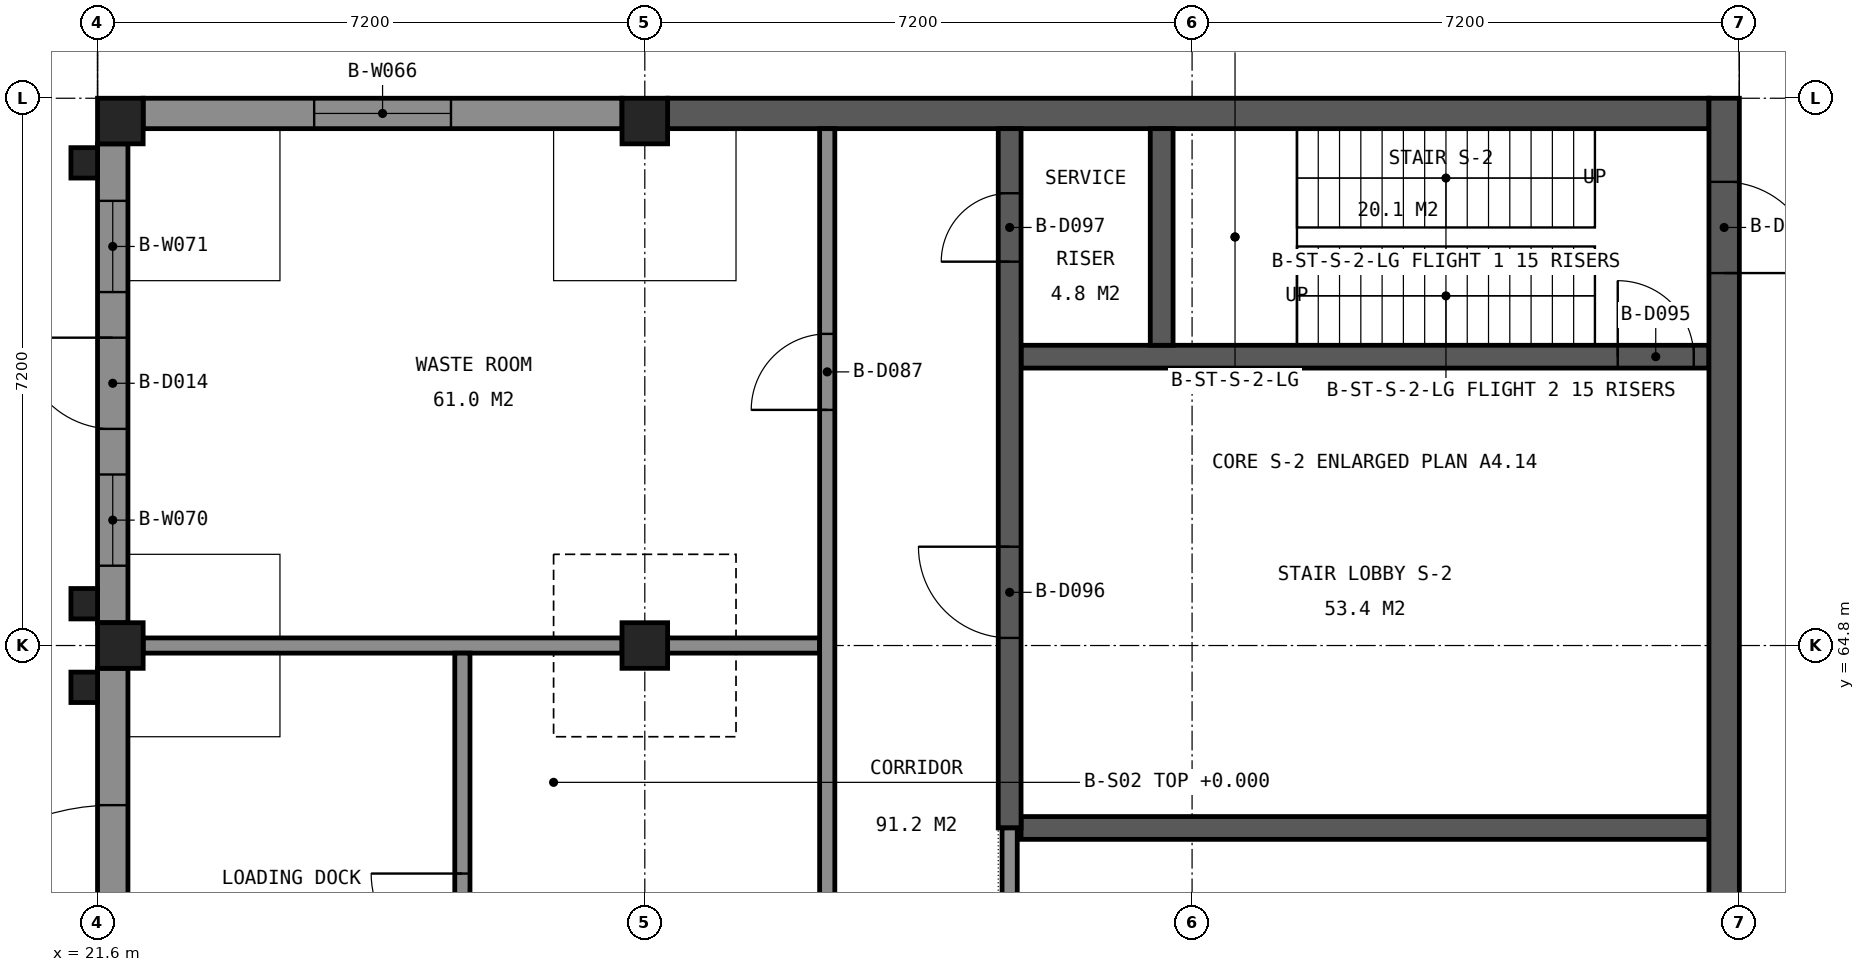
"""IFC4 building model, lengths in metres.
Left out: names, types, materials, properties, quantities, classifications, styles, units other than length and angle.
Written with IfcOpenShell. Run it as: python <this file> out.ifc"""

import sys

from ifc_helpers import new_model, si_unit, direction, frame, frame_2d, origin, origin_2d, place, context, subcontext, project, spatial, rectangle, extrude, element, fill, save


model = new_model("IFC4")
c1 = context("Model", 3, precision=1e-05, world=origin(), true_north=direction((0.0, 1.0)))
c2 = subcontext(c1, "Body", "Model", "MODEL_VIEW")
j1 = project(units=[si_unit("LENGTHUNIT", "METRE"), si_unit("PLANEANGLEUNIT", "RADIAN")], contexts=[c1])
p1 = place(None, origin())
s1 = spatial("IfcSite", under=j1, at=p1, CompositionType="ELEMENT")
p2 = place(p1, origin())
s2 = spatial("IfcBuilding", under=s1, at=p2, CompositionType="ELEMENT")
p3 = place(p2, origin())
s3 = spatial("IfcBuildingStorey", under=s2, at=p3, CompositionType="ELEMENT", Elevation=0.0)
for number, where, z_axis, x_axis in (
    (1, (21.9, 64.8, 0.0), (0.0, 0.0, 1.0), (1.0, 0.0, 0.0)),
    (2, (21.9, 71.7, 0.0), (0.0, 0.0, 1.0), (1.0, 0.0, 0.0)),
    (3, (28.8, 64.8, 0.0), (0.0, 0.0, 1.0), (1.0, 0.0, 0.0)),
    (4, (28.8, 71.7, 0.0), (0.0, 0.0, 1.0), (1.0, 0.0, 0.0)),
):
    element("IfcColumn", number, at=place(p3, frame(where, z_axis=z_axis, x_axis=x_axis)), inside=s3, PredefinedType="COLUMN", context=c2, shape_type="SweptSolid", body=[
        extrude(rectangle(XDim=0.6, YDim=0.6, at=origin_2d()), origin(), (0.0, 0.0, 1.0), 4.8),
    ])
p4 = place(p3, frame((33.75, 62.4, 0.0), z_axis=(0.0, 0.0, 1.0), x_axis=(1.0, 0.0, 0.0)))
e5 = element("IfcWall", 5, at=p4, inside=s3, PredefinedType="SHEAR", context=c2, shape_type="SweptSolid", body=[
    extrude(rectangle(XDim=9.05, YDim=0.3, at=frame_2d((4.525, 0.0))), origin(), (0.0, 0.0, 1.0), 4.55),
])
p5 = place(p3, frame((33.75, 68.6, 0.0), z_axis=(0.0, 0.0, 1.0), x_axis=(1.0, 0.0, 0.0)))
e6 = element("IfcWall", 6, at=p5, inside=s3, PredefinedType="SHEAR", context=c2, shape_type="SweptSolid", body=[
    extrude(rectangle(XDim=9.05, YDim=0.3, at=frame_2d((4.525, 0.0))), origin(), (0.0, 0.0, 1.0), 4.55),
])
p6 = place(p5, frame((7.85, 0.0, 0.0)))
e7 = element("IfcOpeningElement", 7, at=p6, cuts=e6, PredefinedType="OPENING", context=c2, shape_type="SweptSolid", body=[
    extrude(rectangle(XDim=1.0, YDim=2.1, at=frame_2d((0.5, 1.05))), frame((0.0, 0.16, 0.0), z_axis=(0.0, -1.0, 0.0), x_axis=(1.0, 0.0, 0.0)), (0.0, 0.0, 1.0), 0.32),
])
p7 = place(p3, frame((29.1, 71.8, 0.0), z_axis=(0.0, 0.0, 1.0), x_axis=(1.0, 0.0, 0.0)))
e8 = element("IfcWall", 8, at=p7, inside=s3, PredefinedType="SHEAR", context=c2, shape_type="SweptSolid", body=[
    extrude(rectangle(XDim=13.7, YDim=0.4, at=frame_2d((6.85, 0.0))), origin(), (0.0, 0.0, 1.0), 4.55),
])
p8 = place(p3, frame((33.6, 62.4, 0.0), z_axis=(0.0, 0.0, 1.0), x_axis=(0.0, 1.0, 0.0)))
e9 = element("IfcWall", 9, at=p8, inside=s3, PredefinedType="SHEAR", context=c2, shape_type="SweptSolid", body=[
    extrude(rectangle(XDim=9.2, YDim=0.3, at=frame_2d((4.6, 0.0))), origin(), (0.0, 0.0, 1.0), 4.55),
])
p9 = place(p8, frame((2.5, 0.0, 0.0)))
e10 = element("IfcOpeningElement", 10, at=p9, cuts=e9, PredefinedType="OPENING", context=c2, shape_type="SweptSolid", body=[
    extrude(rectangle(XDim=1.2, YDim=2.1, at=frame_2d((0.6, 1.05))), frame((0.0, 0.16, 0.0), z_axis=(0.0, -1.0, 0.0), x_axis=(1.0, 0.0, 0.0)), (0.0, 0.0, 1.0), 0.32),
])
p10 = place(p8, frame((7.45, 0.0, 0.0)))
e11 = element("IfcOpeningElement", 11, at=p10, cuts=e9, PredefinedType="OPENING", context=c2, shape_type="SweptSolid", body=[
    extrude(rectangle(XDim=0.9, YDim=2.1, at=frame_2d((0.45, 1.05))), frame((0.0, 0.16, 0.0), z_axis=(0.0, -1.0, 0.0), x_axis=(1.0, 0.0, 0.0)), (0.0, 0.0, 1.0), 0.32),
])
p11 = place(p3, frame((35.6, 68.75, 0.0), z_axis=(0.0, 0.0, 1.0), x_axis=(0.0, 1.0, 0.0)))
e12 = element("IfcWall", 12, at=p11, inside=s3, PredefinedType="SHEAR", context=c2, shape_type="SweptSolid", body=[
    extrude(rectangle(XDim=2.85, YDim=0.3, at=frame_2d((1.425, 0.0))), origin(), (0.0, 0.0, 1.0), 4.55),
])
p12 = place(p3, frame((43.0, 57.9, 0.0), z_axis=(0.0, 0.0, 1.0), x_axis=(0.0, 1.0, 0.0)))
e13 = element("IfcWall", 13, at=p12, inside=s3, PredefinedType="SHEAR", context=c2, shape_type="SweptSolid", body=[
    extrude(rectangle(XDim=14.1, YDim=0.4, at=frame_2d((7.05, 0.0))), origin(), (0.0, 0.0, 1.0), 4.55),
])
p13 = place(p12, frame((13.0, 0.0, 0.0), z_axis=(0.0, 0.0, 1.0), x_axis=(-1.0, 0.0, 0.0)))
e14 = element("IfcOpeningElement", 14, at=p13, cuts=e13, PredefinedType="OPENING", context=c2, shape_type="SweptSolid", body=[
    extrude(rectangle(XDim=1.2, YDim=2.1, at=frame_2d((0.6, 1.05))), frame((0.0, 0.21, 0.0), z_axis=(0.0, -1.0, 0.0), x_axis=(1.0, 0.0, 0.0)), (0.0, 0.0, 1.0), 0.42),
])
p14 = place(p3, frame((22.2, 71.8, 0.0), z_axis=(0.0, 0.0, 1.0), x_axis=(1.0, 0.0, 0.0)))
e15 = element("IfcWall", 15, at=p14, inside=s3, PredefinedType="SOLIDWALL", context=c2, shape_type="SweptSolid", body=[
    extrude(rectangle(XDim=6.3, YDim=0.4, at=frame_2d((3.15, 0.0))), origin(), (0.0, 0.0, 1.0), 3.95),
])
p15 = place(p14, frame((2.25, 0.0, 2.0)))
e16 = element("IfcOpeningElement", 16, at=p15, cuts=e15, PredefinedType="OPENING", context=c2, shape_type="SweptSolid", body=[
    extrude(rectangle(XDim=1.8, YDim=1.5, at=frame_2d((0.9, 0.75))), frame((0.0, 0.21, 0.0), z_axis=(0.0, -1.0, 0.0), x_axis=(1.0, 0.0, 0.0)), (0.0, 0.0, 1.0), 0.42),
])
p16 = place(p3, frame((21.8, 57.9, 0.0), z_axis=(0.0, 0.0, 1.0), x_axis=(0.0, 1.0, 0.0)))
e17 = element("IfcWall", 17, at=p16, inside=s3, PredefinedType="SOLIDWALL", context=c2, shape_type="SweptSolid", body=[
    extrude(rectangle(XDim=6.6, YDim=0.4, at=frame_2d((3.3, 0.0))), origin(), (0.0, 0.0, 1.0), 3.95),
])
p17 = place(p16, frame((1.8, 0.0, 0.0)))
e18 = element("IfcOpeningElement", 18, at=p17, cuts=e17, PredefinedType="OPENING", context=c2, shape_type="SweptSolid", body=[
    extrude(rectangle(XDim=3.0, YDim=3.0, at=frame_2d((1.5, 1.5))), frame((0.0, 0.21, 0.0), z_axis=(0.0, -1.0, 0.0), x_axis=(1.0, 0.0, 0.0)), (0.0, 0.0, 1.0), 0.42),
])
p18 = place(p3, frame((21.8, 65.1, 0.0), z_axis=(0.0, 0.0, 1.0), x_axis=(0.0, 1.0, 0.0)))
e19 = element("IfcWall", 19, at=p18, inside=s3, PredefinedType="SOLIDWALL", context=c2, shape_type="SweptSolid", body=[
    extrude(rectangle(XDim=6.3, YDim=0.4, at=frame_2d((3.15, 0.0))), origin(), (0.0, 0.0, 1.0), 3.95),
])
p19 = place(p18, frame((2.55, 0.0, 0.0)))
e20 = element("IfcOpeningElement", 20, at=p19, cuts=e19, PredefinedType="OPENING", context=c2, shape_type="SweptSolid", body=[
    extrude(rectangle(XDim=1.2, YDim=2.1, at=frame_2d((0.6, 1.05))), frame((0.0, 0.21, 0.0), z_axis=(0.0, -1.0, 0.0), x_axis=(1.0, 0.0, 0.0)), (0.0, 0.0, 1.0), 0.42),
])
p20 = place(p18, frame((0.75, 0.0, 2.0)))
e21 = element("IfcOpeningElement", 21, at=p20, cuts=e19, PredefinedType="OPENING", context=c2, shape_type="SweptSolid", body=[
    extrude(rectangle(XDim=1.2, YDim=1.5, at=frame_2d((0.6, 0.75))), frame((0.0, 0.21, 0.0), z_axis=(0.0, -1.0, 0.0), x_axis=(1.0, 0.0, 0.0)), (0.0, 0.0, 1.0), 0.42),
])
p21 = place(p18, frame((4.35, 0.0, 2.0)))
e22 = element("IfcOpeningElement", 22, at=p21, cuts=e19, PredefinedType="OPENING", context=c2, shape_type="SweptSolid", body=[
    extrude(rectangle(XDim=1.2, YDim=1.5, at=frame_2d((0.6, 0.75))), frame((0.0, 0.21, 0.0), z_axis=(0.0, -1.0, 0.0), x_axis=(1.0, 0.0, 0.0)), (0.0, 0.0, 1.0), 0.42),
])
for number, where, z_axis, x_axis in (
    (23, (21.425, 64.25, -0.25), (0.0, 0.0, 1.0), (1.0, 0.0, 0.0)),
    (24, (21.425, 65.35, -0.25), (0.0, 0.0, 1.0), (1.0, 0.0, 0.0)),
    (25, (21.425, 71.15, -0.25), (0.0, 0.0, 1.0), (1.0, 0.0, 0.0)),
):
    element("IfcColumn", number, at=place(p3, frame(where, z_axis=z_axis, x_axis=x_axis)), inside=s3, PredefinedType="COLUMN", context=c2, shape_type="SweptSolid", body=[
        extrude(rectangle(XDim=0.35, YDim=0.4, at=origin_2d()), origin(), (0.0, 0.0, 1.0), 5.05),
    ])
p22 = place(p3, frame((21.54, 62.8, 0.0), z_axis=(0.0, 0.0, 1.0), x_axis=(0.0, 1.0, 0.0)))
e26 = element("IfcWall", 26, at=p22, inside=s3, PredefinedType="SOLIDWALL", context=c2, shape_type="SweptSolid", body=[
    extrude(rectangle(XDim=1.25, YDim=0.12, at=frame_2d((0.625, 0.0))), origin(), (0.0, 0.0, 1.0), 0.6),
])
p23 = place(p3, frame((21.54, 64.45, 0.0), z_axis=(0.0, 0.0, 1.0), x_axis=(0.0, 1.0, 0.0)))
e27 = element("IfcWall", 27, at=p23, inside=s3, PredefinedType="SOLIDWALL", context=c2, shape_type="SweptSolid", body=[
    extrude(rectangle(XDim=0.7, YDim=0.12, at=frame_2d((0.35, 0.0))), origin(), (0.0, 0.0, 1.0), 0.6),
])
for number, where, z_axis, x_axis in (
    (28, (21.54, 65.55, 0.0), (0.0, 0.0, 1.0), (0.0, 1.0, 0.0)),
    (29, (21.54, 68.95, 0.0), (0.0, 0.0, 1.0), (0.0, 1.0, 0.0)),
):
    element("IfcWall", number, at=place(p3, frame(where, z_axis=z_axis, x_axis=x_axis)), inside=s3, PredefinedType="SOLIDWALL", context=c2, shape_type="SweptSolid", body=[
        extrude(rectangle(XDim=2.0, YDim=0.12, at=frame_2d((1.0, 0.0))), origin(), (0.0, 0.0, 1.0), 0.6),
    ])
p24 = place(p3, frame((21.54, 71.35, 0.0), z_axis=(0.0, 0.0, 1.0), x_axis=(0.0, 1.0, 0.0)))
e30 = element("IfcWall", 30, at=p24, inside=s3, PredefinedType="SOLIDWALL", context=c2, shape_type="SweptSolid", body=[
    extrude(rectangle(XDim=0.65, YDim=0.12, at=frame_2d((0.325, 0.0))), origin(), (0.0, 0.0, 1.0), 0.6),
])
p25 = place(p3, frame((43.26, 58.35, 0.0), z_axis=(0.0, 0.0, 1.0), x_axis=(0.0, 1.0, 0.0)))
e31 = element("IfcWall", 31, at=p25, inside=s3, PredefinedType="SOLIDWALL", context=c2, shape_type="SweptSolid", body=[
    extrude(rectangle(XDim=4.45, YDim=0.12, at=frame_2d((2.225, 0.0))), origin(), (0.0, 0.0, 1.0), 0.6),
])
p26 = place(p3, frame((43.26, 64.0, 0.0), z_axis=(0.0, 0.0, 1.0), x_axis=(0.0, 1.0, 0.0)))
e32 = element("IfcWall", 32, at=p26, inside=s3, PredefinedType="SOLIDWALL", context=c2, shape_type="SweptSolid", body=[
    extrude(rectangle(XDim=5.6, YDim=0.12, at=frame_2d((2.8, 0.0))), origin(), (0.0, 0.0, 1.0), 0.6),
])
p27 = place(p3, frame((43.26, 71.0, 0.0), z_axis=(0.0, 0.0, 1.0), x_axis=(0.0, 1.0, 0.0)))
e33 = element("IfcWall", 33, at=p27, inside=s3, PredefinedType="SOLIDWALL", context=c2, shape_type="SweptSolid", body=[
    extrude(rectangle(XDim=1.0, YDim=0.12, at=frame_2d((0.5, 0.0))), origin(), (0.0, 0.0, 1.0), 0.6),
])
p28 = place(p3, frame((22.2, 64.8, 0.0), z_axis=(0.0, 0.0, 1.0), x_axis=(1.0, 0.0, 0.0)))
e34 = element("IfcWall", 34, at=p28, inside=s3, PredefinedType="PARTITIONING", context=c2, shape_type="SweptSolid", body=[
    extrude(rectangle(XDim=6.3, YDim=0.2, at=frame_2d((3.15, 0.0))), origin(), (0.0, 0.0, 1.0), 3.95),
])
p29 = place(p3, frame((29.1, 64.8, 0.0), z_axis=(0.0, 0.0, 1.0), x_axis=(1.0, 0.0, 0.0)))
e35 = element("IfcWall", 35, at=p29, inside=s3, PredefinedType="PARTITIONING", context=c2, shape_type="SweptSolid", body=[
    extrude(rectangle(XDim=2.0, YDim=0.2, at=frame_2d((1.0, 0.0))), origin(), (0.0, 0.0, 1.0), 3.95),
])
p30 = place(p3, frame((26.4, 43.3, 0.0), z_axis=(0.0, 0.0, 1.0), x_axis=(0.0, 1.0, 0.0)))
e36 = element("IfcWall", 36, at=p30, inside=s3, PredefinedType="PARTITIONING", context=c2, shape_type="SweptSolid", body=[
    extrude(rectangle(XDim=21.4, YDim=0.2, at=frame_2d((10.7, 0.0))), origin(), (0.0, 0.0, 1.0), 3.95),
])
p31 = place(p30, frame((2.9, 0.0, 0.0)))
e37 = element("IfcOpeningElement", 37, at=p31, cuts=e36, PredefinedType="OPENING", context=c2, shape_type="SweptSolid", body=[
    extrude(rectangle(XDim=1.2, YDim=2.1, at=frame_2d((0.6, 1.05))), frame((0.0, 0.11, 0.0), z_axis=(0.0, -1.0, 0.0), x_axis=(1.0, 0.0, 0.0)), (0.0, 0.0, 1.0), 0.22),
])
p32 = place(p30, frame((10.1, 0.0, 0.0)))
e38 = element("IfcOpeningElement", 38, at=p32, cuts=e36, PredefinedType="OPENING", context=c2, shape_type="SweptSolid", body=[
    extrude(rectangle(XDim=1.2, YDim=2.1, at=frame_2d((0.6, 1.05))), frame((0.0, 0.11, 0.0), z_axis=(0.0, -1.0, 0.0), x_axis=(1.0, 0.0, 0.0)), (0.0, 0.0, 1.0), 0.22),
])
p33 = place(p30, frame((17.3, 0.0, 0.0)))
e39 = element("IfcOpeningElement", 39, at=p33, cuts=e36, PredefinedType="OPENING", context=c2, shape_type="SweptSolid", body=[
    extrude(rectangle(XDim=1.2, YDim=2.1, at=frame_2d((0.6, 1.05))), frame((0.0, 0.11, 0.0), z_axis=(0.0, -1.0, 0.0), x_axis=(1.0, 0.0, 0.0)), (0.0, 0.0, 1.0), 0.22),
])
p34 = place(p3, frame((31.2, 29.2, 0.0), z_axis=(0.0, 0.0, 1.0), x_axis=(0.0, 1.0, 0.0)))
e40 = element("IfcWall", 40, at=p34, inside=s3, PredefinedType="PARTITIONING", context=c2, shape_type="SweptSolid", body=[
    extrude(rectangle(XDim=42.4, YDim=0.2, at=frame_2d((21.2, 0.0))), origin(), (0.0, 0.0, 1.0), 3.95),
])
p35 = place(p34, frame((6.2, 0.0, 0.0)))
e41 = element("IfcOpeningElement", 41, at=p35, cuts=e40, PredefinedType="OPENING", context=c2, shape_type="SweptSolid", body=[
    extrude(rectangle(XDim=1.2, YDim=2.1, at=frame_2d((0.6, 1.05))), frame((0.0, 0.11, 0.0), z_axis=(0.0, -1.0, 0.0), x_axis=(1.0, 0.0, 0.0)), (0.0, 0.0, 1.0), 0.22),
])
p36 = place(p34, frame((23.9, 0.0, 0.0)))
e42 = element("IfcOpeningElement", 42, at=p36, cuts=e40, PredefinedType="OPENING", context=c2, shape_type="SweptSolid", body=[
    extrude(rectangle(XDim=1.8, YDim=2.1, at=frame_2d((0.9, 1.05))), frame((0.0, 0.11, 0.0), z_axis=(0.0, -1.0, 0.0), x_axis=(1.0, 0.0, 0.0)), (0.0, 0.0, 1.0), 0.22),
])
p37 = place(p34, frame((38.7, 0.0, 0.0)))
e43 = element("IfcOpeningElement", 43, at=p37, cuts=e40, PredefinedType="OPENING", context=c2, shape_type="SweptSolid", body=[
    extrude(rectangle(XDim=1.0, YDim=2.1, at=frame_2d((0.5, 1.05))), frame((0.0, 0.11, 0.0), z_axis=(0.0, -1.0, 0.0), x_axis=(1.0, 0.0, 0.0)), (0.0, 0.0, 1.0), 0.22),
])
p38 = place(p3, frame((33.6, 38.4, 0.0), z_axis=(0.0, 0.0, 1.0), x_axis=(0.0, 1.0, 0.0)))
e44 = element("IfcWall", 44, at=p38, inside=s3, PredefinedType="PARTITIONING", context=c2, shape_type="SweptSolid", body=[
    extrude(rectangle(XDim=24.0, YDim=0.2, at=frame_2d((12.0, 0.0))), origin(), (0.0, 0.0, 1.0), 3.95),
])
p39 = place(p38, frame((5.1, 0.0, 0.0)))
e45 = element("IfcOpeningElement", 45, at=p39, cuts=e44, PredefinedType="OPENING", context=c2, shape_type="SweptSolid", body=[
    extrude(rectangle(XDim=1.8, YDim=2.1, at=frame_2d((0.9, 1.05))), frame((0.0, 0.11, 0.0), z_axis=(0.0, -1.0, 0.0), x_axis=(1.0, 0.0, 0.0)), (0.0, 0.0, 1.0), 0.22),
])
p40 = place(p38, frame((17.1, 0.0, 0.0)))
e46 = element("IfcOpeningElement", 46, at=p40, cuts=e44, PredefinedType="OPENING", context=c2, shape_type="SweptSolid", body=[
    extrude(rectangle(XDim=1.8, YDim=2.1, at=frame_2d((0.9, 1.05))), frame((0.0, 0.11, 0.0), z_axis=(0.0, -1.0, 0.0), x_axis=(1.0, 0.0, 0.0)), (0.0, 0.0, 1.0), 0.22),
])
p41 = place(p17, origin())
e47 = element("IfcDoor", 47, at=p41, inside=s3, OperationType="ROLLINGUP", PredefinedType="DOOR", context=c2, shape_type="SweptSolid", body=[
    extrude(rectangle(XDim=3.0, YDim=3.0, at=frame_2d((1.5, 1.5))), frame((0.0, 0.025, 0.0), z_axis=(0.0, -1.0, 0.0), x_axis=(1.0, 0.0, 0.0)), (0.0, 0.0, 1.0), 0.05),
])
fill(e18, e47)
p42 = place(p19, origin())
e48 = element("IfcDoor", 48, at=p42, inside=s3, OperationType="SINGLE_SWING_RIGHT", PredefinedType="DOOR", context=c2, shape_type="SweptSolid", body=[
    extrude(rectangle(XDim=1.2, YDim=2.1, at=frame_2d((0.6, 1.05))), frame((0.0, 0.025, 0.0), z_axis=(0.0, -1.0, 0.0), x_axis=(1.0, 0.0, 0.0)), (0.0, 0.0, 1.0), 0.05),
])
fill(e20, e48)
p43 = place(p13, origin())
e49 = element("IfcDoor", 49, at=p43, inside=s3, OperationType="SINGLE_SWING_RIGHT", PredefinedType="DOOR", context=c2, shape_type="SweptSolid", body=[
    extrude(rectangle(XDim=1.2, YDim=2.1, at=frame_2d((0.6, 1.05))), frame((0.0, 0.025, 0.0), z_axis=(0.0, -1.0, 0.0), x_axis=(1.0, 0.0, 0.0)), (0.0, 0.0, 1.0), 0.05),
])
fill(e14, e49)
p44 = place(p15, origin())
e50 = element("IfcWindow", 50, at=p44, inside=s3, PartitioningType="SINGLE_PANEL", PredefinedType="WINDOW", context=c2, shape_type="SweptSolid", body=[
    extrude(rectangle(XDim=1.8, YDim=1.5, at=frame_2d((0.9, 0.75))), frame((0.0, 0.03, 0.0), z_axis=(0.0, -1.0, 0.0), x_axis=(1.0, 0.0, 0.0)), (0.0, 0.0, 1.0), 0.06),
])
fill(e16, e50)
p45 = place(p20, origin())
e51 = element("IfcWindow", 51, at=p45, inside=s3, PartitioningType="SINGLE_PANEL", PredefinedType="WINDOW", context=c2, shape_type="SweptSolid", body=[
    extrude(rectangle(XDim=1.2, YDim=1.5, at=frame_2d((0.6, 0.75))), frame((0.0, 0.03, 0.0), z_axis=(0.0, -1.0, 0.0), x_axis=(1.0, 0.0, 0.0)), (0.0, 0.0, 1.0), 0.06),
])
fill(e21, e51)
p46 = place(p21, origin())
e52 = element("IfcWindow", 52, at=p46, inside=s3, PartitioningType="SINGLE_PANEL", PredefinedType="WINDOW", context=c2, shape_type="SweptSolid", body=[
    extrude(rectangle(XDim=1.2, YDim=1.5, at=frame_2d((0.6, 0.75))), frame((0.0, 0.03, 0.0), z_axis=(0.0, -1.0, 0.0), x_axis=(1.0, 0.0, 0.0)), (0.0, 0.0, 1.0), 0.06),
])
fill(e22, e52)
p47 = place(p33, origin())
e53 = element("IfcDoor", 53, at=p47, inside=s3, OperationType="SINGLE_SWING_RIGHT", PredefinedType="DOOR", context=c2, shape_type="SweptSolid", body=[
    extrude(rectangle(XDim=1.2, YDim=2.1, at=frame_2d((0.6, 1.05))), frame((0.0, 0.025, 0.0), z_axis=(0.0, -1.0, 0.0), x_axis=(1.0, 0.0, 0.0)), (0.0, 0.0, 1.0), 0.05),
])
fill(e39, e53)
p48 = place(p37, origin())
e54 = element("IfcDoor", 54, at=p48, inside=s3, OperationType="SINGLE_SWING_LEFT", PredefinedType="DOOR", context=c2, shape_type="SweptSolid", body=[
    extrude(rectangle(XDim=1.0, YDim=2.1, at=frame_2d((0.5, 1.05))), frame((0.0, 0.025, 0.0), z_axis=(0.0, -1.0, 0.0), x_axis=(1.0, 0.0, 0.0)), (0.0, 0.0, 1.0), 0.05),
])
fill(e43, e54)
p49 = place(p6, origin())
e55 = element("IfcDoor", 55, at=p49, inside=s3, OperationType="SINGLE_SWING_LEFT", PredefinedType="DOOR", context=c2, shape_type="SweptSolid", body=[
    extrude(rectangle(XDim=1.0, YDim=2.1, at=frame_2d((0.5, 1.05))), frame((0.0, 0.025, 0.0), z_axis=(0.0, -1.0, 0.0), x_axis=(1.0, 0.0, 0.0)), (0.0, 0.0, 1.0), 0.05),
])
fill(e7, e55)
p50 = place(p9, origin())
e56 = element("IfcDoor", 56, at=p50, inside=s3, OperationType="SINGLE_SWING_RIGHT", PredefinedType="DOOR", context=c2, shape_type="SweptSolid", body=[
    extrude(rectangle(XDim=1.2, YDim=2.1, at=frame_2d((0.6, 1.05))), frame((0.0, 0.025, 0.0), z_axis=(0.0, -1.0, 0.0), x_axis=(1.0, 0.0, 0.0)), (0.0, 0.0, 1.0), 0.05),
])
fill(e10, e56)
p51 = place(p10, origin())
e57 = element("IfcDoor", 57, at=p51, inside=s3, OperationType="SINGLE_SWING_LEFT", PredefinedType="DOOR", context=c2, shape_type="SweptSolid", body=[
    extrude(rectangle(XDim=0.9, YDim=2.1, at=frame_2d((0.45, 1.05))), frame((0.0, 0.025, 0.0), z_axis=(0.0, -1.0, 0.0), x_axis=(1.0, 0.0, 0.0)), (0.0, 0.0, 1.0), 0.05),
])
fill(e11, e57)
save(model, sys.argv[1])
